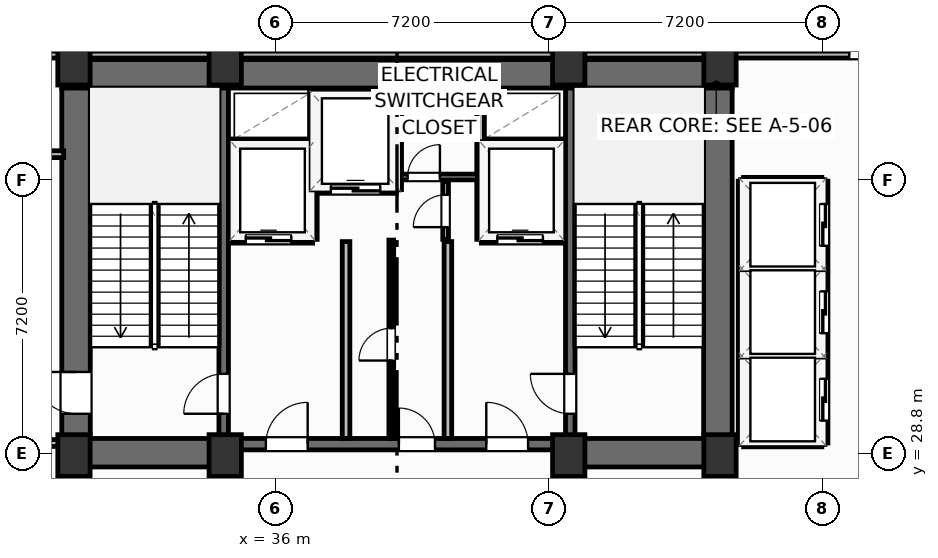
"""IFC4 building model, lengths in metres.
Left out: names, types, materials, properties, quantities, classifications, styles, units other than length and angle.
Written with IfcOpenShell. Run it as: python <this file> out.ifc"""

import sys

from ifc_helpers import new_model, si_unit, direction, frame, frame_2d, origin, origin_2d, place, context, subcontext, project, spatial, rectangle, extrude, element, fill, save


model = new_model("IFC4")
c1 = context("Model", 3, precision=1e-05, world=origin(), true_north=direction((0.0, 1.0)))
c2 = subcontext(c1, "Body", "Model", "MODEL_VIEW")
j1 = project(units=[si_unit("LENGTHUNIT", "METRE"), si_unit("PLANEANGLEUNIT", "RADIAN")], contexts=[c1])
p1 = place(None, origin())
s1 = spatial("IfcSite", under=j1, at=p1, CompositionType="ELEMENT")
p2 = place(p1, origin())
s2 = spatial("IfcBuilding", under=s1, at=p2, CompositionType="ELEMENT")
p3 = place(p2, frame((0.0, 0.0, 162.4)))
s3 = spatial("IfcBuildingStorey", under=s2, at=p3, CompositionType="ELEMENT", Elevation=162.4)
for number, where, z_axis, x_axis in (
    (1, (30.7, 28.75, 0.0), (0.0, 0.0, 1.0), (1.0, 0.0, 0.0)),
    (2, (34.68, 28.75, 0.0), (0.0, 0.0, 1.0), (1.0, 0.0, 0.0)),
    (3, (43.72, 28.75, 0.0), (0.0, 0.0, 1.0), (1.0, 0.0, 0.0)),
    (4, (47.7, 28.75, 0.0), (0.0, 0.0, 1.0), (1.0, 0.0, 0.0)),
    (5, (30.7, 39.05, 0.0), (0.0, 0.0, 1.0), (1.0, 0.0, 0.0)),
    (6, (34.68, 39.05, 0.0), (0.0, 0.0, 1.0), (1.0, 0.0, 0.0)),
    (7, (43.72, 39.05, 0.0), (0.0, 0.0, 1.0), (1.0, 0.0, 0.0)),
    (8, (47.7, 39.05, 0.0), (0.0, 0.0, 1.0), (1.0, 0.0, 0.0)),
):
    element("IfcColumn", number, at=place(p3, frame(where, z_axis=z_axis, x_axis=x_axis)), inside=s3, PredefinedType="COLUMN", context=c2, shape_type="SweptSolid", body=[
        extrude(rectangle(XDim=0.85, YDim=1.1, at=origin_2d()), origin(), (0.0, 0.0, 1.0), 4.8),
    ])
p4 = place(p3, frame((30.38, 38.795, 0.0), z_axis=(0.0, 0.0, 1.0), x_axis=(1.0, 0.0, 0.0)))
e9 = element("IfcWall", 9, at=p4, inside=s3, PredefinedType="SHEAR", context=c2, shape_type="SweptSolid", body=[
    extrude(rectangle(XDim=17.64, YDim=0.75, at=frame_2d((8.82, 0.0))), origin(), (0.0, 0.0, 1.0), 4.55),
])
p5 = place(p3, frame((30.755, 29.2, 0.0), z_axis=(0.0, 0.0, 1.0), x_axis=(0.0, 1.0, 0.0)))
e10 = element("IfcWall", 10, at=p5, inside=s3, PredefinedType="SHEAR", context=c2, shape_type="SweptSolid", body=[
    extrude(rectangle(XDim=9.22, YDim=0.75, at=frame_2d((4.61, 0.0))), origin(), (0.0, 0.0, 1.0), 4.55),
])
p6 = place(p5, frame((0.65, 0.0, 0.0)))
e11 = element("IfcOpeningElement", 11, at=p6, cuts=e10, PredefinedType="OPENING", context=c2, shape_type="SweptSolid", body=[
    extrude(rectangle(XDim=1.1, YDim=2.15, at=frame_2d((0.55, 1.075))), frame((0.0, 0.385, 0.0), z_axis=(0.0, -1.0, 0.0), x_axis=(1.0, 0.0, 0.0)), (0.0, 0.0, 1.0), 0.77),
])
p7 = place(p3, frame((47.645, 29.2, 0.0), z_axis=(0.0, 0.0, 1.0), x_axis=(0.0, 1.0, 0.0)))
e12 = element("IfcWall", 12, at=p7, inside=s3, PredefinedType="SHEAR", context=c2, shape_type="SweptSolid", body=[
    extrude(rectangle(XDim=9.22, YDim=0.75, at=frame_2d((4.61, 0.0))), origin(), (0.0, 0.0, 1.0), 4.55),
])
p8 = place(p3, frame((30.38, 28.825, 0.0), z_axis=(0.0, 0.0, 1.0), x_axis=(1.0, 0.0, 0.0)))
e13 = element("IfcWall", 13, at=p8, inside=s3, PredefinedType="SHEAR", context=c2, shape_type="SweptSolid", body=[
    extrude(rectangle(XDim=4.42, YDim=0.75, at=frame_2d((2.21, 0.0))), origin(), (0.0, 0.0, 1.0), 4.55),
])
p9 = place(p3, frame((43.6, 28.825, 0.0), z_axis=(0.0, 0.0, 1.0), x_axis=(1.0, 0.0, 0.0)))
e14 = element("IfcWall", 14, at=p9, inside=s3, PredefinedType="SHEAR", context=c2, shape_type="SweptSolid", body=[
    extrude(rectangle(XDim=4.42, YDim=0.75, at=frame_2d((2.21, 0.0))), origin(), (0.0, 0.0, 1.0), 4.55),
])
p10 = place(p3, frame((34.8, 29.05, 0.0), z_axis=(0.0, 0.0, 1.0), x_axis=(1.0, 0.0, 0.0)))
e15 = element("IfcWall", 15, at=p10, inside=s3, PredefinedType="SHEAR", context=c2, shape_type="SweptSolid", body=[
    extrude(rectangle(XDim=8.8, YDim=0.3, at=frame_2d((4.4, 0.0))), origin(), (0.0, 0.0, 1.0), 4.55),
])
p11 = place(p10, frame((0.95, 0.0, 0.0)))
e16 = element("IfcOpeningElement", 16, at=p11, cuts=e15, PredefinedType="OPENING", context=c2, shape_type="SweptSolid", body=[
    extrude(rectangle(XDim=1.1, YDim=2.15, at=frame_2d((0.55, 1.075))), frame((0.0, 0.16, 0.0), z_axis=(0.0, -1.0, 0.0), x_axis=(1.0, 0.0, 0.0)), (0.0, 0.0, 1.0), 0.32),
])
p12 = place(p10, frame((6.75, 0.0, 0.0)))
e17 = element("IfcOpeningElement", 17, at=p12, cuts=e15, PredefinedType="OPENING", context=c2, shape_type="SweptSolid", body=[
    extrude(rectangle(XDim=1.1, YDim=2.15, at=frame_2d((0.55, 1.075))), frame((0.0, 0.16, 0.0), z_axis=(0.0, -1.0, 0.0), x_axis=(1.0, 0.0, 0.0)), (0.0, 0.0, 1.0), 0.32),
])
p13 = place(p10, frame((4.45, 0.0, 0.0)))
e18 = element("IfcOpeningElement", 18, at=p13, cuts=e15, PredefinedType="OPENING", context=c2, shape_type="SweptSolid", body=[
    extrude(rectangle(XDim=0.95, YDim=2.15, at=frame_2d((0.475, 1.075))), frame((0.0, 0.16, 0.0), z_axis=(0.0, -1.0, 0.0), x_axis=(1.0, 0.0, 0.0)), (0.0, 0.0, 1.0), 0.32),
])
p14 = place(p3, frame((34.64, 29.2, 0.0), z_axis=(0.0, 0.0, 1.0), x_axis=(0.0, 1.0, 0.0)))
e19 = element("IfcWall", 19, at=p14, inside=s3, PredefinedType="SHEAR", context=c2, shape_type="SweptSolid", body=[
    extrude(rectangle(XDim=9.22, YDim=0.25, at=frame_2d((4.61, 0.0))), origin(), (0.0, 0.0, 1.0), 4.55),
])
p15 = place(p14, frame((0.65, 0.0, 0.0)))
e20 = element("IfcOpeningElement", 20, at=p15, cuts=e19, PredefinedType="OPENING", context=c2, shape_type="SweptSolid", body=[
    extrude(rectangle(XDim=1.05, YDim=2.15, at=frame_2d((0.525, 1.075))), frame((0.0, 0.135, 0.0), z_axis=(0.0, -1.0, 0.0), x_axis=(1.0, 0.0, 0.0)), (0.0, 0.0, 1.0), 0.27),
])
p16 = place(p3, frame((43.76, 29.2, 0.0), z_axis=(0.0, 0.0, 1.0), x_axis=(0.0, 1.0, 0.0)))
e21 = element("IfcWall", 21, at=p16, inside=s3, PredefinedType="SHEAR", context=c2, shape_type="SweptSolid", body=[
    extrude(rectangle(XDim=9.22, YDim=0.25, at=frame_2d((4.61, 0.0))), origin(), (0.0, 0.0, 1.0), 4.55),
])
p17 = place(p16, frame((0.65, 0.0, 0.0)))
e22 = element("IfcOpeningElement", 22, at=p17, cuts=e21, PredefinedType="OPENING", context=c2, shape_type="SweptSolid", body=[
    extrude(rectangle(XDim=1.05, YDim=2.15, at=frame_2d((0.525, 1.075))), frame((0.0, 0.135, 0.0), z_axis=(0.0, -1.0, 0.0), x_axis=(1.0, 0.0, 0.0)), (0.0, 0.0, 1.0), 0.27),
])
p18 = place(p3, frame((20.4, 29.08, 0.0), z_axis=(0.0, 0.0, 1.0), x_axis=(1.0, 0.0, 0.0)))
e23 = element("IfcWall", 23, at=p18, inside=s3, PredefinedType="PARTITIONING", context=c2, shape_type="SweptSolid", body=[
    extrude(rectangle(XDim=9.95, YDim=0.18, at=frame_2d((4.975, 0.0))), origin(), (0.0, 0.0, 1.0), 4.55),
])
p19 = place(p18, frame((2.4, 0.0, 0.0)))
e24 = element("IfcOpeningElement", 24, at=p19, cuts=e23, PredefinedType="OPENING", context=c2, shape_type="SweptSolid", body=[
    extrude(rectangle(XDim=1.1, YDim=2.15, at=frame_2d((0.55, 1.075))), frame((0.0, 0.1, 0.0), z_axis=(0.0, -1.0, 0.0), x_axis=(1.0, 0.0, 0.0)), (0.0, 0.0, 1.0), 0.2),
])
p20 = place(p3, frame((20.4, 36.68, 0.0), z_axis=(0.0, 0.0, 1.0), x_axis=(1.0, 0.0, 0.0)))
e25 = element("IfcWall", 25, at=p20, inside=s3, PredefinedType="PARTITIONING", context=c2, shape_type="SweptSolid", body=[
    extrude(rectangle(XDim=10.03, YDim=0.18, at=frame_2d((5.015, 0.0))), origin(), (0.0, 0.0, 1.0), 4.55),
])
p21 = place(p3, frame((20.0, 39.3, 0.0), z_axis=(0.0, 0.0, 1.0), x_axis=(1.0, 0.0, 0.0)))
e26 = element("IfcWall", 26, at=p21, inside=s3, PredefinedType="PARTITIONING", context=c2, shape_type="SweptSolid", body=[
    extrude(rectangle(XDim=33.3, YDim=0.18, at=frame_2d((16.65, 0.0))), origin(), (0.0, 0.0, 1.0), 3.762),
])
p22 = place(p21, frame((31.1, 0.0, 0.0)))
e27 = element("IfcOpeningElement", 27, at=p22, cuts=e26, PredefinedType="OPENING", context=c2, shape_type="SweptSolid", body=[
    extrude(rectangle(XDim=1.0, YDim=2.05, at=frame_2d((0.5, 1.025))), frame((0.0, 0.1, 0.0), z_axis=(0.0, -1.0, 0.0), x_axis=(1.0, 0.0, 0.0)), (0.0, 0.0, 1.0), 0.2),
])
for number, where, z_axis, x_axis in (
    (28, (37.86, 29.2, 0.0), (0.0, 0.0, 1.0), (0.0, 1.0, 0.0)),
    (29, (40.54, 29.2, 0.0), (0.0, 0.0, 1.0), (0.0, 1.0, 0.0)),
):
    element("IfcWall", number, at=place(p3, frame(where, z_axis=z_axis, x_axis=x_axis)), inside=s3, PredefinedType="PARTITIONING", context=c2, shape_type="SweptSolid", body=[
        extrude(rectangle(XDim=5.18, YDim=0.2, at=frame_2d((2.59, 0.0))), origin(), (0.0, 0.0, 1.0), 4.55),
    ])
p23 = place(p3, frame((34.8, 34.44, 0.0), z_axis=(0.0, 0.0, 1.0), x_axis=(1.0, 0.0, 0.0)))
e30 = element("IfcWall", 30, at=p23, inside=s3, PredefinedType="PARTITIONING", context=c2, shape_type="SweptSolid", body=[
    extrude(rectangle(XDim=2.18, YDim=0.2, at=frame_2d((1.09, 0.0))), origin(), (0.0, 0.0, 1.0), 4.55),
])
p24 = place(p23, frame((0.42, 0.0, 0.0)))
e31 = element("IfcOpeningElement", 31, at=p24, cuts=e30, PredefinedType="OPENING", context=c2, shape_type="SweptSolid", body=[
    extrude(rectangle(XDim=1.2, YDim=2.2, at=frame_2d((0.6, 1.1))), frame((0.0, 0.11, 0.0), z_axis=(0.0, -1.0, 0.0), x_axis=(1.0, 0.0, 0.0)), (0.0, 0.0, 1.0), 0.22),
])
p25 = place(p3, frame((34.8, 36.98, 0.0), z_axis=(0.0, 0.0, 1.0), x_axis=(1.0, 0.0, 0.0)))
e32 = element("IfcWall", 32, at=p25, inside=s3, PredefinedType="PARTITIONING", context=c2, shape_type="SweptSolid", body=[
    extrude(rectangle(XDim=2.18, YDim=0.2, at=frame_2d((1.09, 0.0))), origin(), (0.0, 0.0, 1.0), 4.55),
])
p26 = place(p3, frame((37.0, 34.44, 0.0), z_axis=(0.0, 0.0, 1.0), x_axis=(0.0, 1.0, 0.0)))
e33 = element("IfcWall", 33, at=p26, inside=s3, PredefinedType="PARTITIONING", context=c2, shape_type="SweptSolid", body=[
    extrude(rectangle(XDim=3.9, YDim=0.2, at=frame_2d((1.95, 0.0))), origin(), (0.0, 0.0, 1.0), 4.55),
])
p27 = place(p3, frame((41.42, 34.44, 0.0), z_axis=(0.0, 0.0, 1.0), x_axis=(1.0, 0.0, 0.0)))
e34 = element("IfcWall", 34, at=p27, inside=s3, PredefinedType="PARTITIONING", context=c2, shape_type="SweptSolid", body=[
    extrude(rectangle(XDim=2.18, YDim=0.2, at=frame_2d((1.09, 0.0))), origin(), (0.0, 0.0, 1.0), 4.55),
])
p28 = place(p27, frame((0.42, 0.0, 0.0)))
e35 = element("IfcOpeningElement", 35, at=p28, cuts=e34, PredefinedType="OPENING", context=c2, shape_type="SweptSolid", body=[
    extrude(rectangle(XDim=1.2, YDim=2.2, at=frame_2d((0.6, 1.1))), frame((0.0, 0.11, 0.0), z_axis=(0.0, -1.0, 0.0), x_axis=(1.0, 0.0, 0.0)), (0.0, 0.0, 1.0), 0.22),
])
p29 = place(p3, frame((41.42, 36.98, 0.0), z_axis=(0.0, 0.0, 1.0), x_axis=(1.0, 0.0, 0.0)))
e36 = element("IfcWall", 36, at=p29, inside=s3, PredefinedType="PARTITIONING", context=c2, shape_type="SweptSolid", body=[
    extrude(rectangle(XDim=2.18, YDim=0.2, at=frame_2d((1.09, 0.0))), origin(), (0.0, 0.0, 1.0), 4.55),
])
p30 = place(p3, frame((41.4, 34.44, 0.0), z_axis=(0.0, 0.0, 1.0), x_axis=(0.0, 1.0, 0.0)))
e37 = element("IfcWall", 37, at=p30, inside=s3, PredefinedType="PARTITIONING", context=c2, shape_type="SweptSolid", body=[
    extrude(rectangle(XDim=3.9, YDim=0.2, at=frame_2d((1.95, 0.0))), origin(), (0.0, 0.0, 1.0), 4.55),
])
p31 = place(p3, frame((37.06, 35.75, 0.0), z_axis=(0.0, 0.0, 1.0), x_axis=(1.0, 0.0, 0.0)))
e38 = element("IfcWall", 38, at=p31, inside=s3, PredefinedType="PARTITIONING", context=c2, shape_type="SweptSolid", body=[
    extrude(rectangle(XDim=2.12, YDim=0.2, at=frame_2d((1.06, 0.0))), origin(), (0.0, 0.0, 1.0), 4.55),
])
p32 = place(p31, frame((0.4, 0.0, 0.0)))
e39 = element("IfcOpeningElement", 39, at=p32, cuts=e38, PredefinedType="OPENING", context=c2, shape_type="SweptSolid", body=[
    extrude(rectangle(XDim=1.3, YDim=2.2, at=frame_2d((0.65, 1.1))), frame((0.0, 0.11, 0.0), z_axis=(0.0, -1.0, 0.0), x_axis=(1.0, 0.0, 0.0)), (0.0, 0.0, 1.0), 0.22),
])
p33 = place(p3, frame((39.22, 35.75, 0.0), z_axis=(0.0, 0.0, 1.0), x_axis=(0.0, 1.0, 0.0)))
e40 = element("IfcWall", 40, at=p33, inside=s3, PredefinedType="PARTITIONING", context=c2, shape_type="SweptSolid", body=[
    extrude(rectangle(XDim=2.59, YDim=0.2, at=frame_2d((1.295, 0.0))), origin(), (0.0, 0.0, 1.0), 4.55),
])
p34 = place(p3, frame((39.3, 36.08, 0.0), z_axis=(0.0, 0.0, 1.0), x_axis=(1.0, 0.0, 0.0)))
e41 = element("IfcWall", 41, at=p34, inside=s3, PredefinedType="PARTITIONING", context=c2, shape_type="SweptSolid", body=[
    extrude(rectangle(XDim=2.02, YDim=0.15, at=frame_2d((1.01, 0.0))), origin(), (0.0, 0.0, 1.0), 4.55),
])
p35 = place(p34, frame((0.18, 0.0, 0.0)))
e42 = element("IfcOpeningElement", 42, at=p35, cuts=e41, PredefinedType="OPENING", context=c2, shape_type="SweptSolid", body=[
    extrude(rectangle(XDim=0.85, YDim=2.05, at=frame_2d((0.425, 1.025))), frame((0.0, 0.085, 0.0), z_axis=(0.0, -1.0, 0.0), x_axis=(1.0, 0.0, 0.0)), (0.0, 0.0, 1.0), 0.17),
])
p36 = place(p3, frame((40.48, 34.44, 0.0), z_axis=(0.0, 0.0, 1.0), x_axis=(0.0, 1.0, 0.0)))
e43 = element("IfcWall", 43, at=p36, inside=s3, PredefinedType="PARTITIONING", context=c2, shape_type="SweptSolid", body=[
    extrude(rectangle(XDim=1.52, YDim=0.15, at=frame_2d((0.76, 0.0))), origin(), (0.0, 0.0, 1.0), 4.55),
])
p37 = place(p36, frame((0.32, 0.0, 0.0)))
e44 = element("IfcOpeningElement", 44, at=p37, cuts=e43, PredefinedType="OPENING", context=c2, shape_type="SweptSolid", body=[
    extrude(rectangle(XDim=0.85, YDim=2.05, at=frame_2d((0.425, 1.025))), frame((0.0, 0.085, 0.0), z_axis=(0.0, -1.0, 0.0), x_axis=(1.0, 0.0, 0.0)), (0.0, 0.0, 1.0), 0.17),
])
p38 = place(p3, frame((39.05, 29.2, 0.0), z_axis=(0.0, 0.0, 1.0), x_axis=(0.0, 1.0, 0.0)))
e45 = element("IfcWall", 45, at=p38, inside=s3, PredefinedType="PARTITIONING", context=c2, shape_type="SweptSolid", body=[
    extrude(rectangle(XDim=5.22, YDim=0.125, at=frame_2d((2.61, 0.0))), origin(), (0.0, 0.0, 1.0), 4.55),
])
p39 = place(p38, frame((2.05, 0.0, 0.0)))
e46 = element("IfcOpeningElement", 46, at=p39, cuts=e45, PredefinedType="OPENING", context=c2, shape_type="SweptSolid", body=[
    extrude(rectangle(XDim=0.85, YDim=2.05, at=frame_2d((0.425, 1.025))), frame((0.0, 0.073, 0.0), z_axis=(0.0, -1.0, 0.0), x_axis=(1.0, 0.0, 0.0)), (0.0, 0.0, 1.0), 0.145),
])
for number, where, z_axis, x_axis in (
    (47, (48.32, 31.375, 0.0), (0.0, 0.0, 1.0), (1.0, 0.0, 0.0)),
    (48, (48.32, 33.675, 0.0), (0.0, 0.0, 1.0), (1.0, 0.0, 0.0)),
):
    element("IfcWall", number, at=place(p3, frame(where, z_axis=z_axis, x_axis=x_axis)), inside=s3, PredefinedType="PARTITIONING", context=c2, shape_type="SweptSolid", body=[
        extrude(rectangle(XDim=2.06, YDim=0.2, at=frame_2d((1.03, 0.0))), origin(), (0.0, 0.0, 1.0), 4.55),
    ])
p40 = place(p3, frame((48.32, 29.08, 0.0), z_axis=(0.0, 0.0, 1.0), x_axis=(1.0, 0.0, 0.0)))
e49 = element("IfcWall", 49, at=p40, inside=s3, PredefinedType="PARTITIONING", context=c2, shape_type="SweptSolid", body=[
    extrude(rectangle(XDim=2.06, YDim=0.2, at=frame_2d((1.03, 0.0))), origin(), (0.0, 0.0, 1.0), 3.762),
])
p41 = place(p3, frame((48.32, 35.97, 0.0), z_axis=(0.0, 0.0, 1.0), x_axis=(1.0, 0.0, 0.0)))
e50 = element("IfcWall", 50, at=p41, inside=s3, PredefinedType="PARTITIONING", context=c2, shape_type="SweptSolid", body=[
    extrude(rectangle(XDim=2.06, YDim=0.2, at=frame_2d((1.03, 0.0))), origin(), (0.0, 0.0, 1.0), 4.55),
])
p42 = place(p3, frame((48.28, 29.08, 0.0), z_axis=(0.0, 0.0, 1.0), x_axis=(0.0, 1.0, 0.0)))
e51 = element("IfcWall", 51, at=p42, inside=s3, PredefinedType="PARTITIONING", context=c2, shape_type="SweptSolid", body=[
    extrude(rectangle(XDim=6.89, YDim=0.2, at=frame_2d((3.445, 0.0))), origin(), (0.0, 0.0, 1.0), 4.55),
])
p43 = place(p3, frame((50.44, 29.08, 0.0), z_axis=(0.0, 0.0, 1.0), x_axis=(0.0, 1.0, 0.0)))
e52 = element("IfcWall", 52, at=p43, inside=s3, PredefinedType="PARTITIONING", context=c2, shape_type="SweptSolid", body=[
    extrude(rectangle(XDim=6.89, YDim=0.2, at=frame_2d((3.445, 0.0))), origin(), (0.0, 0.0, 1.0), 4.55),
])
p44 = place(p43, frame((0.59, 0.0, 0.0)))
e53 = element("IfcOpeningElement", 53, at=p44, cuts=e52, PredefinedType="OPENING", context=c2, shape_type="SweptSolid", body=[
    extrude(rectangle(XDim=1.1, YDim=2.15, at=frame_2d((0.55, 1.075))), frame((0.0, 0.11, 0.0), z_axis=(0.0, -1.0, 0.0), x_axis=(1.0, 0.0, 0.0)), (0.0, 0.0, 1.0), 0.22),
])
p45 = place(p43, frame((2.89, 0.0, 0.0)))
e54 = element("IfcOpeningElement", 54, at=p45, cuts=e52, PredefinedType="OPENING", context=c2, shape_type="SweptSolid", body=[
    extrude(rectangle(XDim=1.1, YDim=2.15, at=frame_2d((0.55, 1.075))), frame((0.0, 0.11, 0.0), z_axis=(0.0, -1.0, 0.0), x_axis=(1.0, 0.0, 0.0)), (0.0, 0.0, 1.0), 0.22),
])
p46 = place(p43, frame((5.19, 0.0, 0.0)))
e55 = element("IfcOpeningElement", 55, at=p46, cuts=e52, PredefinedType="OPENING", context=c2, shape_type="SweptSolid", body=[
    extrude(rectangle(XDim=1.1, YDim=2.15, at=frame_2d((0.55, 1.075))), frame((0.0, 0.11, 0.0), z_axis=(0.0, -1.0, 0.0), x_axis=(1.0, 0.0, 0.0)), (0.0, 0.0, 1.0), 0.22),
])
p47 = place(p6, origin())
e56 = element("IfcDoor", 56, at=p47, inside=s3, OperationType="SINGLE_SWING_RIGHT", PredefinedType="DOOR", context=c2, shape_type="SweptSolid", body=[
    extrude(rectangle(XDim=1.1, YDim=2.15, at=frame_2d((0.55, 1.075))), frame((0.0, 0.025, 0.0), z_axis=(0.0, -1.0, 0.0), x_axis=(1.0, 0.0, 0.0)), (0.0, 0.0, 1.0), 0.05),
])
fill(e11, e56)
p48 = place(p22, origin())
e57 = element("IfcDoor", 57, at=p48, inside=s3, OperationType="SINGLE_SWING_LEFT", PredefinedType="DOOR", context=c2, shape_type="SweptSolid", body=[
    extrude(rectangle(XDim=1.0, YDim=2.05, at=frame_2d((0.5, 1.025))), frame((0.0, 0.025, 0.0), z_axis=(0.0, -1.0, 0.0), x_axis=(1.0, 0.0, 0.0)), (0.0, 0.0, 1.0), 0.05),
])
fill(e27, e57)
p49 = place(p15, origin())
e58 = element("IfcDoor", 58, at=p49, inside=s3, OperationType="SINGLE_SWING_LEFT", PredefinedType="DOOR", context=c2, shape_type="SweptSolid", body=[
    extrude(rectangle(XDim=1.05, YDim=2.15, at=frame_2d((0.525, 1.075))), frame((0.0, 0.025, 0.0), z_axis=(0.0, -1.0, 0.0), x_axis=(1.0, 0.0, 0.0)), (0.0, 0.0, 1.0), 0.05),
])
fill(e20, e58)
p50 = place(p17, origin())
e59 = element("IfcDoor", 59, at=p50, inside=s3, OperationType="SINGLE_SWING_RIGHT", PredefinedType="DOOR", context=c2, shape_type="SweptSolid", body=[
    extrude(rectangle(XDim=1.05, YDim=2.15, at=frame_2d((0.525, 1.075))), frame((0.0, 0.025, 0.0), z_axis=(0.0, -1.0, 0.0), x_axis=(1.0, 0.0, 0.0)), (0.0, 0.0, 1.0), 0.05),
])
fill(e22, e59)
p51 = place(p11, origin())
e60 = element("IfcDoor", 60, at=p51, inside=s3, OperationType="SINGLE_SWING_RIGHT", PredefinedType="DOOR", context=c2, shape_type="SweptSolid", body=[
    extrude(rectangle(XDim=1.1, YDim=2.15, at=frame_2d((0.55, 1.075))), frame((0.0, 0.025, 0.0), z_axis=(0.0, -1.0, 0.0), x_axis=(1.0, 0.0, 0.0)), (0.0, 0.0, 1.0), 0.05),
])
fill(e16, e60)
p52 = place(p12, origin())
e61 = element("IfcDoor", 61, at=p52, inside=s3, OperationType="SINGLE_SWING_LEFT", PredefinedType="DOOR", context=c2, shape_type="SweptSolid", body=[
    extrude(rectangle(XDim=1.1, YDim=2.15, at=frame_2d((0.55, 1.075))), frame((0.0, 0.025, 0.0), z_axis=(0.0, -1.0, 0.0), x_axis=(1.0, 0.0, 0.0)), (0.0, 0.0, 1.0), 0.05),
])
fill(e17, e61)
p53 = place(p24, origin())
e62 = element("IfcDoor", 62, at=p53, inside=s3, OperationType="SLIDING_TO_LEFT", PredefinedType="DOOR", context=c2, shape_type="SweptSolid", body=[
    extrude(rectangle(XDim=1.2, YDim=2.2, at=frame_2d((0.6, 1.1))), frame((0.0, 0.025, 0.0), z_axis=(0.0, -1.0, 0.0), x_axis=(1.0, 0.0, 0.0)), (0.0, 0.0, 1.0), 0.05),
])
fill(e31, e62)
p54 = place(p28, origin())
e63 = element("IfcDoor", 63, at=p54, inside=s3, OperationType="SLIDING_TO_LEFT", PredefinedType="DOOR", context=c2, shape_type="SweptSolid", body=[
    extrude(rectangle(XDim=1.2, YDim=2.2, at=frame_2d((0.6, 1.1))), frame((0.0, 0.025, 0.0), z_axis=(0.0, -1.0, 0.0), x_axis=(1.0, 0.0, 0.0)), (0.0, 0.0, 1.0), 0.05),
])
fill(e35, e63)
p55 = place(p32, origin())
e64 = element("IfcDoor", 64, at=p55, inside=s3, OperationType="SLIDING_TO_LEFT", PredefinedType="DOOR", context=c2, shape_type="SweptSolid", body=[
    extrude(rectangle(XDim=1.3, YDim=2.2, at=frame_2d((0.65, 1.1))), frame((0.0, 0.025, 0.0), z_axis=(0.0, -1.0, 0.0), x_axis=(1.0, 0.0, 0.0)), (0.0, 0.0, 1.0), 0.05),
])
fill(e39, e64)
p56 = place(p35, origin())
e65 = element("IfcDoor", 65, at=p56, inside=s3, OperationType="SINGLE_SWING_RIGHT", PredefinedType="DOOR", context=c2, shape_type="SweptSolid", body=[
    extrude(rectangle(XDim=0.85, YDim=2.05, at=frame_2d((0.425, 1.025))), frame((0.0, 0.025, 0.0), z_axis=(0.0, -1.0, 0.0), x_axis=(1.0, 0.0, 0.0)), (0.0, 0.0, 1.0), 0.05),
])
fill(e42, e65)
p57 = place(p37, origin())
e66 = element("IfcDoor", 66, at=p57, inside=s3, OperationType="SINGLE_SWING_LEFT", PredefinedType="DOOR", context=c2, shape_type="SweptSolid", body=[
    extrude(rectangle(XDim=0.85, YDim=2.05, at=frame_2d((0.425, 1.025))), frame((0.0, 0.025, 0.0), z_axis=(0.0, -1.0, 0.0), x_axis=(1.0, 0.0, 0.0)), (0.0, 0.0, 1.0), 0.05),
])
fill(e44, e66)
p58 = place(p39, origin())
e67 = element("IfcDoor", 67, at=p58, inside=s3, OperationType="SINGLE_SWING_LEFT", PredefinedType="DOOR", context=c2, shape_type="SweptSolid", body=[
    extrude(rectangle(XDim=0.85, YDim=2.05, at=frame_2d((0.425, 1.025))), frame((0.0, 0.025, 0.0), z_axis=(0.0, -1.0, 0.0), x_axis=(1.0, 0.0, 0.0)), (0.0, 0.0, 1.0), 0.05),
])
fill(e46, e67)
p59 = place(p13, origin())
e68 = element("IfcDoor", 68, at=p59, inside=s3, OperationType="SINGLE_SWING_LEFT", PredefinedType="DOOR", context=c2, shape_type="SweptSolid", body=[
    extrude(rectangle(XDim=0.95, YDim=2.15, at=frame_2d((0.475, 1.075))), frame((0.0, 0.025, 0.0), z_axis=(0.0, -1.0, 0.0), x_axis=(1.0, 0.0, 0.0)), (0.0, 0.0, 1.0), 0.05),
])
fill(e18, e68)
p60 = place(p44, origin())
e69 = element("IfcDoor", 69, at=p60, inside=s3, OperationType="SLIDING_TO_LEFT", PredefinedType="DOOR", context=c2, shape_type="SweptSolid", body=[
    extrude(rectangle(XDim=1.1, YDim=2.15, at=frame_2d((0.55, 1.075))), frame((0.0, 0.025, 0.0), z_axis=(0.0, -1.0, 0.0), x_axis=(1.0, 0.0, 0.0)), (0.0, 0.0, 1.0), 0.05),
])
fill(e53, e69)
p61 = place(p45, origin())
e70 = element("IfcDoor", 70, at=p61, inside=s3, OperationType="SLIDING_TO_LEFT", PredefinedType="DOOR", context=c2, shape_type="SweptSolid", body=[
    extrude(rectangle(XDim=1.1, YDim=2.15, at=frame_2d((0.55, 1.075))), frame((0.0, 0.025, 0.0), z_axis=(0.0, -1.0, 0.0), x_axis=(1.0, 0.0, 0.0)), (0.0, 0.0, 1.0), 0.05),
])
fill(e54, e70)
p62 = place(p46, origin())
e71 = element("IfcDoor", 71, at=p62, inside=s3, OperationType="SLIDING_TO_LEFT", PredefinedType="DOOR", context=c2, shape_type="SweptSolid", body=[
    extrude(rectangle(XDim=1.1, YDim=2.15, at=frame_2d((0.55, 1.075))), frame((0.0, 0.025, 0.0), z_axis=(0.0, -1.0, 0.0), x_axis=(1.0, 0.0, 0.0)), (0.0, 0.0, 1.0), 0.05),
])
fill(e55, e71)
save(model, sys.argv[1])
